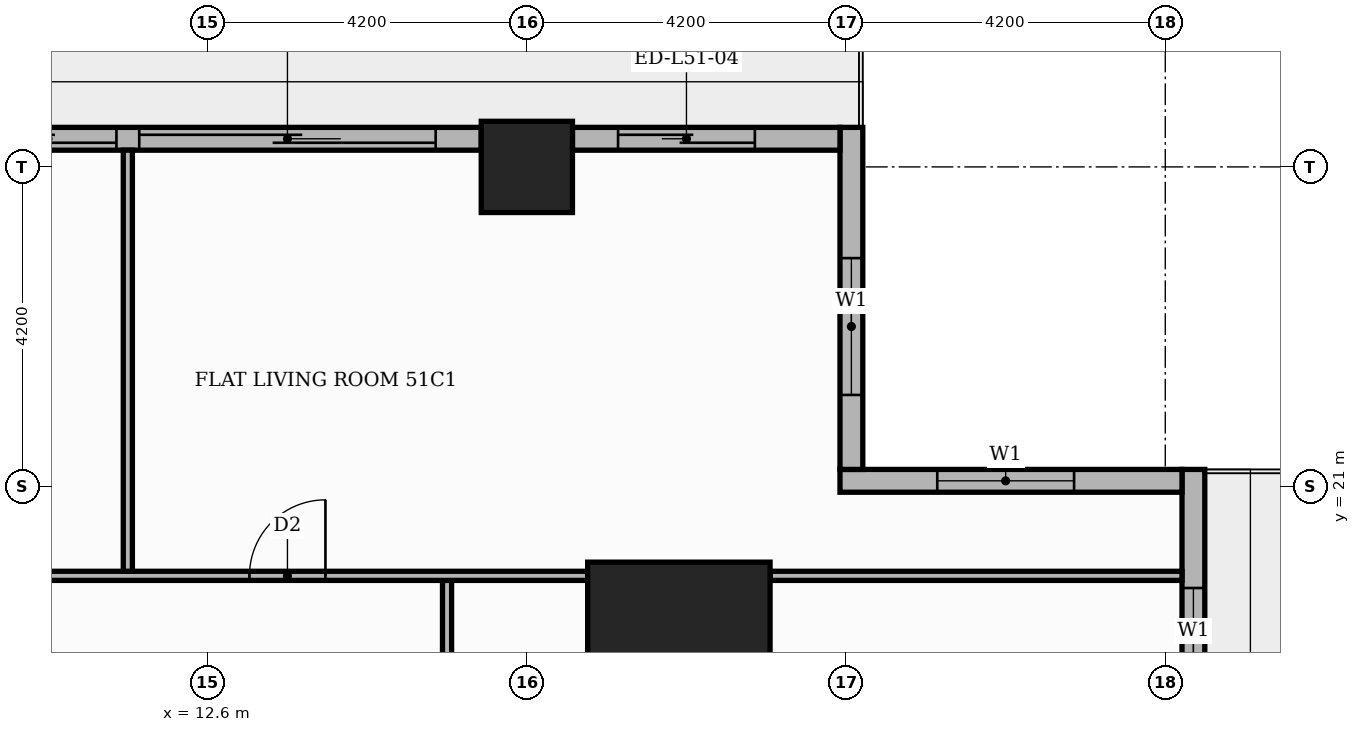
"""IFC4 building model, lengths in metres.
Left out: names, types, materials, properties, quantities, classifications, styles, units other than length and angle.
Written with IfcOpenShell. Run it as: python <this file> out.ifc"""

import sys

from ifc_helpers import new_model, si_unit, direction, frame, frame_2d, origin, origin_2d, place, context, subcontext, project, spatial, rectangle, extrude, element, fill, save


model = new_model("IFC4")
c1 = context("Model", 3, precision=1e-05, world=origin(), true_north=direction((0.0, 1.0)))
c2 = subcontext(c1, "Body", "Model", "MODEL_VIEW")
j1 = project(units=[si_unit("LENGTHUNIT", "METRE"), si_unit("PLANEANGLEUNIT", "RADIAN")], contexts=[c1])
p1 = place(None, origin())
s1 = spatial("IfcSite", under=j1, at=p1, CompositionType="ELEMENT")
p2 = place(p1, origin())
s2 = spatial("IfcBuilding", under=s1, at=p2, CompositionType="ELEMENT")
p3 = place(p2, frame((0.0, 0.0, 215.7)))
s3 = spatial("IfcBuildingStorey", under=s2, at=p3, CompositionType="ELEMENT", Elevation=215.7)
p4 = place(p3, frame((18.8, 18.8, 0.0), z_axis=(0.0, 0.0, 1.0), x_axis=(1.0, 0.0, 0.0)))
e1 = element("IfcColumn", 1, at=p4, inside=s3, PredefinedType="COLUMN", context=c2, shape_type="SweptSolid", body=[
    extrude(rectangle(XDim=2.4, YDim=2.4, at=origin_2d()), origin(), (0.0, 0.0, 1.0), 3.9),
])
p5 = place(p3, frame((16.8, 25.2, 0.0), z_axis=(0.0, 0.0, 1.0), x_axis=(1.0, 0.0, 0.0)))
e2 = element("IfcColumn", 2, at=p5, inside=s3, PredefinedType="COLUMN", context=c2, shape_type="SweptSolid", body=[
    extrude(rectangle(XDim=1.2, YDim=1.2, at=origin_2d()), origin(), (0.0, 0.0, 1.0), 3.9),
])
p6 = place(p3, frame((25.57, 17.4, 0.0), z_axis=(0.0, 0.0, 1.0), x_axis=(0.0, 1.0, 0.0)))
e3 = element("IfcWall", 3, at=p6, inside=s3, PredefinedType="STANDARD", context=c2, shape_type="SweptSolid", body=[
    extrude(rectangle(XDim=3.82, YDim=0.3, at=frame_2d((1.91, 0.0))), origin(), (0.0, 0.0, 1.0), 3.48),
])
p7 = place(p6, frame((0.46, 0.0, 0.9)))
e4 = element("IfcOpeningElement", 4, at=p7, cuts=e3, PredefinedType="OPENING", context=c2, shape_type="SweptSolid", body=[
    extrude(rectangle(XDim=1.8, YDim=2.1, at=frame_2d((0.9, 1.05))), frame((0.0, 0.16, 0.0), z_axis=(0.0, -1.0, 0.0), x_axis=(1.0, 0.0, 0.0)), (0.0, 0.0, 1.0), 0.32),
])
p8 = place(p3, frame((25.42, 21.07, 0.0), z_axis=(0.0, 0.0, 1.0), x_axis=(-1.0, 0.0, 0.0)))
e5 = element("IfcWall", 5, at=p8, inside=s3, PredefinedType="STANDARD", context=c2, shape_type="SweptSolid", body=[
    extrude(rectangle(XDim=4.5, YDim=0.3, at=frame_2d((2.25, 0.0))), origin(), (0.0, 0.0, 1.0), 3.48),
])
p9 = place(p8, frame((1.42, 0.0, 0.9)))
e6 = element("IfcOpeningElement", 6, at=p9, cuts=e5, PredefinedType="OPENING", context=c2, shape_type="SweptSolid", body=[
    extrude(rectangle(XDim=1.8, YDim=2.1, at=frame_2d((0.9, 1.05))), frame((0.0, 0.16, 0.0), z_axis=(0.0, -1.0, 0.0), x_axis=(1.0, 0.0, 0.0)), (0.0, 0.0, 1.0), 0.32),
])
p10 = place(p3, frame((21.07, 21.22, 0.0), z_axis=(0.0, 0.0, 1.0), x_axis=(0.0, 1.0, 0.0)))
e7 = element("IfcWall", 7, at=p10, inside=s3, PredefinedType="STANDARD", context=c2, shape_type="SweptSolid", body=[
    extrude(rectangle(XDim=4.5, YDim=0.3, at=frame_2d((2.25, 0.0))), origin(), (0.0, 0.0, 1.0), 3.48),
])
p11 = place(p10, frame((0.98, 0.0, 0.9)))
e8 = element("IfcOpeningElement", 8, at=p11, cuts=e7, PredefinedType="OPENING", context=c2, shape_type="SweptSolid", body=[
    extrude(rectangle(XDim=1.8, YDim=2.1, at=frame_2d((0.9, 1.05))), frame((0.0, 0.16, 0.0), z_axis=(0.0, -1.0, 0.0), x_axis=(1.0, 0.0, 0.0)), (0.0, 0.0, 1.0), 0.32),
])
p12 = place(p3, frame((20.92, 25.57, 0.0), z_axis=(0.0, 0.0, 1.0), x_axis=(-1.0, 0.0, 0.0)))
e9 = element("IfcWall", 9, at=p12, inside=s3, PredefinedType="STANDARD", context=c2, shape_type="SweptSolid", body=[
    extrude(rectangle(XDim=3.52, YDim=0.3, at=frame_2d((1.76, 0.0))), origin(), (0.0, 0.0, 1.0), 3.48),
])
p13 = place(p12, frame((1.12, 0.0, 0.0)))
e10 = element("IfcOpeningElement", 10, at=p13, cuts=e9, PredefinedType="OPENING", context=c2, shape_type="SweptSolid", body=[
    extrude(rectangle(XDim=1.8, YDim=2.4, at=frame_2d((0.9, 1.2))), frame((0.0, 0.16, 0.0), z_axis=(0.0, -1.0, 0.0), x_axis=(1.0, 0.0, 0.0)), (0.0, 0.0, 1.0), 0.32),
])
p14 = place(p3, frame((16.2, 25.57, 0.0), z_axis=(0.0, 0.0, 1.0), x_axis=(-1.0, 0.0, 0.0)))
e11 = element("IfcWall", 11, at=p14, inside=s3, PredefinedType="STANDARD", context=c2, shape_type="SweptSolid", body=[
    extrude(rectangle(XDim=7.2, YDim=0.3, at=frame_2d((3.6, 0.0))), origin(), (0.0, 0.0, 1.0), 3.48),
])
p15 = place(p14, frame((0.6, 0.0, 0.0)))
e12 = element("IfcOpeningElement", 12, at=p15, cuts=e11, PredefinedType="OPENING", context=c2, shape_type="SweptSolid", body=[
    extrude(rectangle(XDim=3.9, YDim=2.4, at=frame_2d((1.95, 1.2))), frame((0.0, 0.16, 0.0), z_axis=(0.0, -1.0, 0.0), x_axis=(1.0, 0.0, 0.0)), (0.0, 0.0, 1.0), 0.32),
])
p16 = place(p14, frame((4.8, 0.0, 0.0)))
e13 = element("IfcOpeningElement", 13, at=p16, cuts=e11, PredefinedType="OPENING", context=c2, shape_type="SweptSolid", body=[
    extrude(rectangle(XDim=1.8, YDim=2.4, at=frame_2d((0.9, 1.2))), frame((0.0, 0.16, 0.0), z_axis=(0.0, -1.0, 0.0), x_axis=(1.0, 0.0, 0.0)), (0.0, 0.0, 1.0), 0.32),
])
p17 = place(p3, frame((15.75, 13.75, 0.0), z_axis=(0.0, 0.0, 1.0), x_axis=(0.0, 1.0, 0.0)))
e14 = element("IfcWall", 14, at=p17, inside=s3, PredefinedType="PARTITIONING", context=c2, shape_type="SweptSolid", body=[
    extrude(rectangle(XDim=6.01, YDim=0.12, at=frame_2d((3.005, 0.0))), origin(), (0.0, 0.0, 1.0), 3.48),
])
p18 = place(p17, frame((2.535, 0.0, 0.0)))
e15 = element("IfcOpeningElement", 15, at=p18, cuts=e14, PredefinedType="OPENING", context=c2, shape_type="SweptSolid", body=[
    extrude(rectangle(XDim=0.9, YDim=2.1, at=frame_2d((0.45, 1.05))), frame((0.0, 0.07, 0.0), z_axis=(0.0, -1.0, 0.0), x_axis=(1.0, 0.0, 0.0)), (0.0, 0.0, 1.0), 0.14),
])
p19 = place(p3, frame((-13.55, 19.82, 0.0), z_axis=(0.0, 0.0, 1.0), x_axis=(1.0, 0.0, 0.0)))
e16 = element("IfcWall", 16, at=p19, inside=s3, PredefinedType="PARTITIONING", context=c2, shape_type="SweptSolid", body=[
    extrude(rectangle(XDim=31.15, YDim=0.12, at=frame_2d((15.575, 0.0))), origin(), (0.0, 0.0, 1.0), 3.48),
])
p20 = place(p19, frame((26.7, 0.0, 0.0)))
e17 = element("IfcOpeningElement", 17, at=p20, cuts=e16, PredefinedType="OPENING", context=c2, shape_type="SweptSolid", body=[
    extrude(rectangle(XDim=1.0, YDim=2.1, at=frame_2d((0.5, 1.05))), frame((0.0, 0.07, 0.0), z_axis=(0.0, -1.0, 0.0), x_axis=(1.0, 0.0, 0.0)), (0.0, 0.0, 1.0), 0.14),
])
p21 = place(p19, frame((20.4, 0.0, 0.0)))
e18 = element("IfcOpeningElement", 18, at=p21, cuts=e16, PredefinedType="OPENING", context=c2, shape_type="SweptSolid", body=[
    extrude(rectangle(XDim=1.0, YDim=2.1, at=frame_2d((0.5, 1.05))), frame((0.0, 0.07, 0.0), z_axis=(0.0, -1.0, 0.0), x_axis=(1.0, 0.0, 0.0)), (0.0, 0.0, 1.0), 0.14),
])
p22 = place(p19, frame((13.1, 0.0, 0.0)))
e19 = element("IfcOpeningElement", 19, at=p22, cuts=e16, PredefinedType="OPENING", context=c2, shape_type="SweptSolid", body=[
    extrude(rectangle(XDim=0.9, YDim=2.1, at=frame_2d((0.45, 1.05))), frame((0.0, 0.07, 0.0), z_axis=(0.0, -1.0, 0.0), x_axis=(1.0, 0.0, 0.0)), (0.0, 0.0, 1.0), 0.14),
])
p23 = place(p19, frame((3.65, 0.0, 0.0)))
e20 = element("IfcOpeningElement", 20, at=p23, cuts=e16, PredefinedType="OPENING", context=c2, shape_type="SweptSolid", body=[
    extrude(rectangle(XDim=0.9, YDim=2.1, at=frame_2d((0.45, 1.05))), frame((0.0, 0.07, 0.0), z_axis=(0.0, -1.0, 0.0), x_axis=(1.0, 0.0, 0.0)), (0.0, 0.0, 1.0), 0.14),
])
p24 = place(p3, frame((20.0, 19.82, 0.0), z_axis=(0.0, 0.0, 1.0), x_axis=(1.0, 0.0, 0.0)))
e21 = element("IfcWall", 21, at=p24, inside=s3, PredefinedType="PARTITIONING", context=c2, shape_type="SweptSolid", body=[
    extrude(rectangle(XDim=5.42, YDim=0.12, at=frame_2d((2.71, 0.0))), origin(), (0.0, 0.0, 1.0), 3.48),
])
p25 = place(p3, frame((11.55, 19.88, 0.0), z_axis=(0.0, 0.0, 1.0), x_axis=(0.0, 1.0, 0.0)))
e22 = element("IfcWall", 22, at=p25, inside=s3, PredefinedType="PARTITIONING", context=c2, shape_type="SweptSolid", body=[
    extrude(rectangle(XDim=5.54, YDim=0.12, at=frame_2d((2.77, 0.0))), origin(), (0.0, 0.0, 1.0), 3.48),
])
p26 = place(p7, origin())
e23 = element("IfcWindow", 23, at=p26, inside=s3, PartitioningType="SINGLE_PANEL", PredefinedType="WINDOW", context=c2, shape_type="SweptSolid", body=[
    extrude(rectangle(XDim=1.8, YDim=2.1, at=frame_2d((0.9, 1.05))), frame((0.0, 0.03, 0.0), z_axis=(0.0, -1.0, 0.0), x_axis=(1.0, 0.0, 0.0)), (0.0, 0.0, 1.0), 0.06),
])
fill(e4, e23)
p27 = place(p9, origin())
e24 = element("IfcWindow", 24, at=p27, inside=s3, PartitioningType="SINGLE_PANEL", PredefinedType="WINDOW", context=c2, shape_type="SweptSolid", body=[
    extrude(rectangle(XDim=1.8, YDim=2.1, at=frame_2d((0.9, 1.05))), frame((0.0, 0.03, 0.0), z_axis=(0.0, -1.0, 0.0), x_axis=(1.0, 0.0, 0.0)), (0.0, 0.0, 1.0), 0.06),
])
fill(e6, e24)
p28 = place(p11, origin())
e25 = element("IfcWindow", 25, at=p28, inside=s3, PartitioningType="SINGLE_PANEL", PredefinedType="WINDOW", context=c2, shape_type="SweptSolid", body=[
    extrude(rectangle(XDim=1.8, YDim=2.1, at=frame_2d((0.9, 1.05))), frame((0.0, 0.03, 0.0), z_axis=(0.0, -1.0, 0.0), x_axis=(1.0, 0.0, 0.0)), (0.0, 0.0, 1.0), 0.06),
])
fill(e8, e25)
p29 = place(p13, origin())
e26 = element("IfcDoor", 26, at=p29, inside=s3, OperationType="SLIDING_TO_RIGHT", PredefinedType="DOOR", context=c2, shape_type="SweptSolid", body=[
    extrude(rectangle(XDim=1.8, YDim=2.4, at=frame_2d((0.9, 1.2))), frame((0.0, 0.025, 0.0), z_axis=(0.0, -1.0, 0.0), x_axis=(1.0, 0.0, 0.0)), (0.0, 0.0, 1.0), 0.05),
])
fill(e10, e26)
p30 = place(p15, origin())
e27 = element("IfcDoor", 27, at=p30, inside=s3, OperationType="SLIDING_TO_LEFT", PredefinedType="DOOR", context=c2, shape_type="SweptSolid", body=[
    extrude(rectangle(XDim=3.9, YDim=2.4, at=frame_2d((1.95, 1.2))), frame((0.0, 0.025, 0.0), z_axis=(0.0, -1.0, 0.0), x_axis=(1.0, 0.0, 0.0)), (0.0, 0.0, 1.0), 0.05),
])
fill(e12, e27)
p31 = place(p16, origin())
e28 = element("IfcDoor", 28, at=p31, inside=s3, OperationType="SLIDING_TO_RIGHT", PredefinedType="DOOR", context=c2, shape_type="SweptSolid", body=[
    extrude(rectangle(XDim=1.8, YDim=2.4, at=frame_2d((0.9, 1.2))), frame((0.0, 0.025, 0.0), z_axis=(0.0, -1.0, 0.0), x_axis=(1.0, 0.0, 0.0)), (0.0, 0.0, 1.0), 0.05),
])
fill(e13, e28)
p32 = place(p20, origin())
e29 = element("IfcDoor", 29, at=p32, inside=s3, OperationType="SINGLE_SWING_RIGHT", PredefinedType="DOOR", context=c2, shape_type="SweptSolid", body=[
    extrude(rectangle(XDim=1.0, YDim=2.1, at=frame_2d((0.5, 1.05))), frame((0.0, 0.025, 0.0), z_axis=(0.0, -1.0, 0.0), x_axis=(1.0, 0.0, 0.0)), (0.0, 0.0, 1.0), 0.05),
])
fill(e17, e29)
save(model, sys.argv[1])
